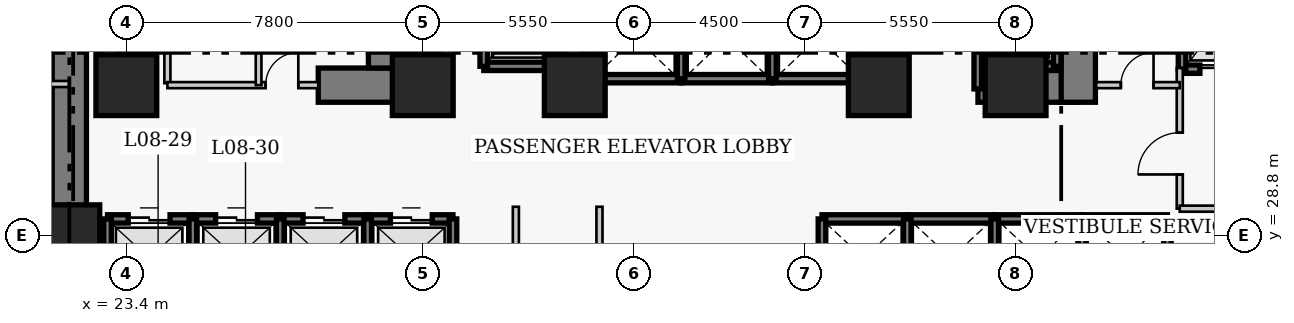
"""IFC4 building model, lengths in metres.
Left out: names, types, materials, properties, quantities, classifications, styles, units other than length and angle.
Written with IfcOpenShell. Run it as: python <this file> out.ifc"""

import sys

from ifc_helpers import new_model, si_unit, direction, frame, frame_2d, origin, origin_2d, place, context, subcontext, project, spatial, rectangle, extrude, element, fill, save


model = new_model("IFC4")
c1 = context("Model", 3, precision=1e-05, world=origin(), true_north=direction((0.0, 1.0)))
c2 = subcontext(c1, "Body", "Model", "MODEL_VIEW")
j1 = project(units=[si_unit("LENGTHUNIT", "METRE"), si_unit("PLANEANGLEUNIT", "RADIAN")], contexts=[c1])
p1 = place(None, origin())
s1 = spatial("IfcSite", under=j1, at=p1, CompositionType="ELEMENT")
p2 = place(p1, origin())
s2 = spatial("IfcBuilding", under=s1, at=p2, CompositionType="ELEMENT")
p3 = place(p2, frame((0.0, 0.0, 37.4)))
s3 = spatial("IfcBuildingStorey", under=s2, at=p3, CompositionType="ELEMENT", Elevation=37.4)
p4 = place(p3, frame((21.9, 27.05, 0.0), z_axis=(0.0, 0.0, 1.0), x_axis=(0.0, 1.0, 0.0)))
e1 = element("IfcWall", 1, at=p4, inside=s3, PredefinedType="SHEAR", context=c2, shape_type="SweptSolid", body=[
    extrude(rectangle(XDim=13.72, YDim=0.9, at=frame_2d((6.86, 0.0))), origin(), (0.0, 0.0, 1.0), 3.8),
])
p5 = place(p3, frame((28.45, 32.75, 0.0), z_axis=(0.0, 0.0, 1.0), x_axis=(1.0, 0.0, 0.0)))
e2 = element("IfcWall", 2, at=p5, inside=s3, PredefinedType="SHEAR", context=c2, shape_type="SweptSolid", body=[
    extrude(rectangle(XDim=2.4, YDim=0.9, at=frame_2d((1.2, 0.0))), origin(), (0.0, 0.0, 1.0), 3.8),
])
p6 = place(p3, frame((45.81, 32.75, 0.0), z_axis=(0.0, 0.0, 1.0), x_axis=(1.0, 0.0, 0.0)))
e3 = element("IfcWall", 3, at=p6, inside=s3, PredefinedType="SHEAR", context=c2, shape_type="SweptSolid", body=[
    extrude(rectangle(XDim=2.64, YDim=0.9, at=frame_2d((1.32, 0.0))), origin(), (0.0, 0.0, 1.0), 3.8),
])
p7 = place(p3, frame((30.22, 33.2, 0.0), z_axis=(0.0, 0.0, 1.0), x_axis=(0.0, 1.0, 0.0)))
e4 = element("IfcWall", 4, at=p7, inside=s3, PredefinedType="SHEAR", context=c2, shape_type="SweptSolid", body=[
    extrude(rectangle(XDim=7.12, YDim=0.9, at=frame_2d((3.56, 0.0))), origin(), (0.0, 0.0, 1.0), 3.8),
])
p8 = place(p3, frame((48.45, 32.3, 0.0), z_axis=(0.0, 0.0, 1.0), x_axis=(0.0, 1.0, 0.0)))
e5 = element("IfcWall", 5, at=p8, inside=s3, PredefinedType="SHEAR", context=c2, shape_type="SweptSolid", body=[
    extrude(rectangle(XDim=8.02, YDim=0.9, at=frame_2d((4.01, 0.0))), origin(), (0.0, 0.0, 1.0), 3.8),
])
p9 = place(p8, frame((5.9, 0.0, 0.0)))
e6 = element("IfcOpeningElement", 6, at=p9, cuts=e5, PredefinedType="OPENING", context=c2, shape_type="SweptSolid", body=[
    extrude(rectangle(XDim=1.1, YDim=2.15, at=frame_2d((0.55, 1.075))), frame((0.0, 0.46, 0.0), z_axis=(0.0, -1.0, 0.0), x_axis=(1.0, 0.0, 0.0)), (0.0, 0.0, 1.0), 0.92),
])
for number, where, z_axis, x_axis in (
    (7, (21.9, 28.8, 0.0), (0.0, 0.0, 1.0), (1.0, 0.0, 0.0)),
    (8, (23.4, 32.75, 0.0), (0.0, 0.0, 1.0), (1.0, 0.0, 0.0)),
    (9, (31.2, 32.75, 0.0), (0.0, 0.0, 1.0), (1.0, 0.0, 0.0)),
    (10, (35.2, 32.75, 0.0), (0.0, 0.0, 1.0), (1.0, 0.0, 0.0)),
    (11, (43.2, 32.75, 0.0), (0.0, 0.0, 1.0), (1.0, 0.0, 0.0)),
    (12, (46.8, 32.75, 0.0), (0.0, 0.0, 1.0), (1.0, 0.0, 0.0)),
):
    element("IfcColumn", number, at=place(p3, frame(where, z_axis=z_axis, x_axis=x_axis)), inside=s3, PredefinedType="COLUMN", context=c2, shape_type="SweptSolid", body=[
        extrude(rectangle(XDim=1.6, YDim=1.6, at=origin_2d()), origin(), (0.0, 0.0, 1.0), 3.8),
    ])
p10 = place(p3, frame((22.905, 29.23, 0.0), z_axis=(0.0, 0.0, 1.0), x_axis=(1.0, 0.0, 0.0)))
e13 = element("IfcWall", 13, at=p10, inside=s3, PredefinedType="SHEAR", context=c2, shape_type="SweptSolid", body=[
    extrude(rectangle(XDim=2.245, YDim=0.22, at=frame_2d((1.123, 0.0))), origin(), (0.0, 0.0, 1.0), 3.8),
])
p11 = place(p10, frame((0.545, 0.0, 0.0)))
e14 = element("IfcOpeningElement", 14, at=p11, cuts=e13, PredefinedType="OPENING", context=c2, shape_type="SweptSolid", body=[
    extrude(rectangle(XDim=1.1, YDim=2.15, at=frame_2d((0.55, 1.075))), frame((0.0, 0.12, 0.0), z_axis=(0.0, -1.0, 0.0), x_axis=(1.0, 0.0, 0.0)), (0.0, 0.0, 1.0), 0.24),
])
p12 = place(p3, frame((22.905, 27.17, 0.0), z_axis=(0.0, 0.0, 1.0), x_axis=(0.0, 1.0, 0.0)))
e15 = element("IfcWall", 15, at=p12, inside=s3, PredefinedType="SHEAR", context=c2, shape_type="SweptSolid", body=[
    extrude(rectangle(XDim=2.06, YDim=0.2, at=frame_2d((1.03, 0.0))), origin(), (0.0, 0.0, 1.0), 3.8),
])
p13 = place(p3, frame((25.15, 29.23, 0.0), z_axis=(0.0, 0.0, 1.0), x_axis=(1.0, 0.0, 0.0)))
e16 = element("IfcWall", 16, at=p13, inside=s3, PredefinedType="SHEAR", context=c2, shape_type="SweptSolid", body=[
    extrude(rectangle(XDim=2.3, YDim=0.22, at=frame_2d((1.15, 0.0))), origin(), (0.0, 0.0, 1.0), 3.8),
])
p14 = place(p13, frame((0.6, 0.0, 0.0)))
e17 = element("IfcOpeningElement", 17, at=p14, cuts=e16, PredefinedType="OPENING", context=c2, shape_type="SweptSolid", body=[
    extrude(rectangle(XDim=1.1, YDim=2.15, at=frame_2d((0.55, 1.075))), frame((0.0, 0.12, 0.0), z_axis=(0.0, -1.0, 0.0), x_axis=(1.0, 0.0, 0.0)), (0.0, 0.0, 1.0), 0.24),
])
p15 = place(p3, frame((25.15, 27.17, 0.0), z_axis=(0.0, 0.0, 1.0), x_axis=(0.0, 1.0, 0.0)))
e18 = element("IfcWall", 18, at=p15, inside=s3, PredefinedType="SHEAR", context=c2, shape_type="SweptSolid", body=[
    extrude(rectangle(XDim=2.06, YDim=0.2, at=frame_2d((1.03, 0.0))), origin(), (0.0, 0.0, 1.0), 3.8),
])
p16 = place(p3, frame((27.45, 29.23, 0.0), z_axis=(0.0, 0.0, 1.0), x_axis=(1.0, 0.0, 0.0)))
e19 = element("IfcWall", 19, at=p16, inside=s3, PredefinedType="SHEAR", context=c2, shape_type="SweptSolid", body=[
    extrude(rectangle(XDim=2.3, YDim=0.22, at=frame_2d((1.15, 0.0))), origin(), (0.0, 0.0, 1.0), 3.8),
])
p17 = place(p16, frame((0.6, 0.0, 0.0)))
e20 = element("IfcOpeningElement", 20, at=p17, cuts=e19, PredefinedType="OPENING", context=c2, shape_type="SweptSolid", body=[
    extrude(rectangle(XDim=1.1, YDim=2.15, at=frame_2d((0.55, 1.075))), frame((0.0, 0.12, 0.0), z_axis=(0.0, -1.0, 0.0), x_axis=(1.0, 0.0, 0.0)), (0.0, 0.0, 1.0), 0.24),
])
p18 = place(p3, frame((27.45, 27.17, 0.0), z_axis=(0.0, 0.0, 1.0), x_axis=(0.0, 1.0, 0.0)))
e21 = element("IfcWall", 21, at=p18, inside=s3, PredefinedType="SHEAR", context=c2, shape_type="SweptSolid", body=[
    extrude(rectangle(XDim=2.06, YDim=0.2, at=frame_2d((1.03, 0.0))), origin(), (0.0, 0.0, 1.0), 3.8),
])
p19 = place(p3, frame((29.75, 29.23, 0.0), z_axis=(0.0, 0.0, 1.0), x_axis=(1.0, 0.0, 0.0)))
e22 = element("IfcWall", 22, at=p19, inside=s3, PredefinedType="SHEAR", context=c2, shape_type="SweptSolid", body=[
    extrude(rectangle(XDim=2.245, YDim=0.22, at=frame_2d((1.123, 0.0))), origin(), (0.0, 0.0, 1.0), 3.8),
])
p20 = place(p19, frame((0.6, 0.0, 0.0)))
e23 = element("IfcOpeningElement", 23, at=p20, cuts=e22, PredefinedType="OPENING", context=c2, shape_type="SweptSolid", body=[
    extrude(rectangle(XDim=1.1, YDim=2.15, at=frame_2d((0.55, 1.075))), frame((0.0, 0.12, 0.0), z_axis=(0.0, -1.0, 0.0), x_axis=(1.0, 0.0, 0.0)), (0.0, 0.0, 1.0), 0.24),
])
for number, where, z_axis, x_axis in (
    (24, (29.75, 27.17, 0.0), (0.0, 0.0, 1.0), (0.0, 1.0, 0.0)),
    (25, (31.995, 27.17, 0.0), (0.0, 0.0, 1.0), (0.0, 1.0, 0.0)),
):
    element("IfcWall", number, at=place(p3, frame(where, z_axis=z_axis, x_axis=x_axis)), inside=s3, PredefinedType="SHEAR", context=c2, shape_type="SweptSolid", body=[
        extrude(rectangle(XDim=2.06, YDim=0.2, at=frame_2d((1.03, 0.0))), origin(), (0.0, 0.0, 1.0), 3.8),
    ])
p21 = place(p3, frame((41.705, 29.23, 0.0), z_axis=(0.0, 0.0, 1.0), x_axis=(1.0, 0.0, 0.0)))
e26 = element("IfcWall", 26, at=p21, inside=s3, PredefinedType="SHEAR", context=c2, shape_type="SweptSolid", body=[
    extrude(rectangle(XDim=2.245, YDim=0.22, at=frame_2d((1.123, 0.0))), origin(), (0.0, 0.0, 1.0), 3.8),
])
p22 = place(p3, frame((41.705, 27.17, 0.0), z_axis=(0.0, 0.0, 1.0), x_axis=(0.0, 1.0, 0.0)))
e27 = element("IfcWall", 27, at=p22, inside=s3, PredefinedType="SHEAR", context=c2, shape_type="SweptSolid", body=[
    extrude(rectangle(XDim=2.06, YDim=0.2, at=frame_2d((1.03, 0.0))), origin(), (0.0, 0.0, 1.0), 3.8),
])
p23 = place(p3, frame((43.95, 29.23, 0.0), z_axis=(0.0, 0.0, 1.0), x_axis=(1.0, 0.0, 0.0)))
e28 = element("IfcWall", 28, at=p23, inside=s3, PredefinedType="SHEAR", context=c2, shape_type="SweptSolid", body=[
    extrude(rectangle(XDim=2.3, YDim=0.22, at=frame_2d((1.15, 0.0))), origin(), (0.0, 0.0, 1.0), 3.8),
])
p24 = place(p3, frame((43.95, 27.17, 0.0), z_axis=(0.0, 0.0, 1.0), x_axis=(0.0, 1.0, 0.0)))
e29 = element("IfcWall", 29, at=p24, inside=s3, PredefinedType="SHEAR", context=c2, shape_type="SweptSolid", body=[
    extrude(rectangle(XDim=2.06, YDim=0.2, at=frame_2d((1.03, 0.0))), origin(), (0.0, 0.0, 1.0), 3.8),
])
p25 = place(p3, frame((46.25, 29.23, 0.0), z_axis=(0.0, 0.0, 1.0), x_axis=(1.0, 0.0, 0.0)))
e30 = element("IfcWall", 30, at=p25, inside=s3, PredefinedType="SHEAR", context=c2, shape_type="SweptSolid", body=[
    extrude(rectangle(XDim=2.3, YDim=0.22, at=frame_2d((1.15, 0.0))), origin(), (0.0, 0.0, 1.0), 3.8),
])
p26 = place(p3, frame((46.25, 27.17, 0.0), z_axis=(0.0, 0.0, 1.0), x_axis=(0.0, 1.0, 0.0)))
e31 = element("IfcWall", 31, at=p26, inside=s3, PredefinedType="SHEAR", context=c2, shape_type="SweptSolid", body=[
    extrude(rectangle(XDim=2.06, YDim=0.2, at=frame_2d((1.03, 0.0))), origin(), (0.0, 0.0, 1.0), 3.8),
])
p27 = place(p3, frame((48.55, 29.23, 0.0), z_axis=(0.0, 0.0, 1.0), x_axis=(1.0, 0.0, 0.0)))
e32 = element("IfcWall", 32, at=p27, inside=s3, PredefinedType="SHEAR", context=c2, shape_type="SweptSolid", body=[
    extrude(rectangle(XDim=2.245, YDim=0.22, at=frame_2d((1.123, 0.0))), origin(), (0.0, 0.0, 1.0), 3.8),
])
for number, where, z_axis, x_axis in (
    (33, (48.55, 27.17, 0.0), (0.0, 0.0, 1.0), (0.0, 1.0, 0.0)),
    (34, (50.795, 27.17, 0.0), (0.0, 0.0, 1.0), (0.0, 1.0, 0.0)),
):
    element("IfcWall", number, at=place(p3, frame(where, z_axis=z_axis, x_axis=x_axis)), inside=s3, PredefinedType="SHEAR", context=c2, shape_type="SweptSolid", body=[
        extrude(rectangle(XDim=2.06, YDim=0.2, at=frame_2d((1.03, 0.0))), origin(), (0.0, 0.0, 1.0), 3.8),
    ])
p28 = place(p3, frame((35.68, 32.92, 0.0), z_axis=(0.0, 0.0, 1.0), x_axis=(1.0, 0.0, 0.0)))
e35 = element("IfcWall", 35, at=p28, inside=s3, PredefinedType="SHEAR", context=c2, shape_type="SweptSolid", body=[
    extrude(rectangle(XDim=2.32, YDim=0.22, at=frame_2d((1.16, 0.0))), origin(), (0.0, 0.0, 1.0), 3.8),
])
p29 = place(p3, frame((35.68, 32.92, 0.0), z_axis=(0.0, 0.0, 1.0), x_axis=(0.0, 1.0, 0.0)))
e36 = element("IfcWall", 36, at=p29, inside=s3, PredefinedType="SHEAR", context=c2, shape_type="SweptSolid", body=[
    extrude(rectangle(XDim=2.16, YDim=0.2, at=frame_2d((1.08, 0.0))), origin(), (0.0, 0.0, 1.0), 3.8),
])
p30 = place(p3, frame((38.0, 32.92, 0.0), z_axis=(0.0, 0.0, 1.0), x_axis=(1.0, 0.0, 0.0)))
e37 = element("IfcWall", 37, at=p30, inside=s3, PredefinedType="SHEAR", context=c2, shape_type="SweptSolid", body=[
    extrude(rectangle(XDim=2.4, YDim=0.22, at=frame_2d((1.2, 0.0))), origin(), (0.0, 0.0, 1.0), 3.8),
])
p31 = place(p3, frame((38.0, 32.92, 0.0), z_axis=(0.0, 0.0, 1.0), x_axis=(0.0, 1.0, 0.0)))
e38 = element("IfcWall", 38, at=p31, inside=s3, PredefinedType="SHEAR", context=c2, shape_type="SweptSolid", body=[
    extrude(rectangle(XDim=2.16, YDim=0.2, at=frame_2d((1.08, 0.0))), origin(), (0.0, 0.0, 1.0), 3.8),
])
p32 = place(p3, frame((40.4, 32.92, 0.0), z_axis=(0.0, 0.0, 1.0), x_axis=(1.0, 0.0, 0.0)))
e39 = element("IfcWall", 39, at=p32, inside=s3, PredefinedType="SHEAR", context=c2, shape_type="SweptSolid", body=[
    extrude(rectangle(XDim=2.32, YDim=0.22, at=frame_2d((1.16, 0.0))), origin(), (0.0, 0.0, 1.0), 3.8),
])
for number, where, z_axis, x_axis in (
    (40, (40.4, 32.92, 0.0), (0.0, 0.0, 1.0), (0.0, 1.0, 0.0)),
    (41, (42.72, 32.92, 0.0), (0.0, 0.0, 1.0), (0.0, 1.0, 0.0)),
):
    element("IfcWall", number, at=place(p3, frame(where, z_axis=z_axis, x_axis=x_axis)), inside=s3, PredefinedType="SHEAR", context=c2, shape_type="SweptSolid", body=[
        extrude(rectangle(XDim=2.16, YDim=0.2, at=frame_2d((1.08, 0.0))), origin(), (0.0, 0.0, 1.0), 3.8),
    ])
p33 = place(p3, frame((51.18, 33.17, 0.0), z_axis=(0.0, 0.0, 1.0), x_axis=(1.0, 0.0, 0.0)))
e42 = element("IfcWall", 42, at=p33, inside=s3, PredefinedType="SHEAR", context=c2, shape_type="SweptSolid", body=[
    extrude(rectangle(XDim=2.42, YDim=0.22, at=frame_2d((1.21, 0.0))), origin(), (0.0, 0.0, 1.0), 3.8),
])
p34 = place(p33, frame((0.47, 0.0, 0.0)))
e43 = element("IfcOpeningElement", 43, at=p34, cuts=e42, PredefinedType="OPENING", context=c2, shape_type="SweptSolid", body=[
    extrude(rectangle(XDim=1.3, YDim=2.15, at=frame_2d((0.65, 1.075))), frame((0.0, 0.12, 0.0), z_axis=(0.0, -1.0, 0.0), x_axis=(1.0, 0.0, 0.0)), (0.0, 0.0, 1.0), 0.24),
])
p35 = place(p3, frame((51.18, 33.17, 0.0), z_axis=(0.0, 0.0, 1.0), x_axis=(0.0, 1.0, 0.0)))
e44 = element("IfcWall", 44, at=p35, inside=s3, PredefinedType="SHEAR", context=c2, shape_type="SweptSolid", body=[
    extrude(rectangle(XDim=2.86, YDim=0.2, at=frame_2d((1.43, 0.0))), origin(), (0.0, 0.0, 1.0), 3.8),
])
p36 = place(p3, frame((32.805, 33.245, 0.0), z_axis=(0.0, 0.0, 1.0), x_axis=(1.0, 0.0, 0.0)))
e45 = element("IfcWall", 45, at=p36, inside=s3, PredefinedType="SHEAR", context=c2, shape_type="SweptSolid", body=[
    extrude(rectangle(XDim=2.09, YDim=0.22, at=frame_2d((1.045, 0.0))), origin(), (0.0, 0.0, 1.0), 3.8),
])
for number, where, z_axis, x_axis in (
    (46, (32.805, 33.245, 0.0), (0.0, 0.0, 1.0), (0.0, 1.0, 0.0)),
    (47, (34.895, 33.245, 0.0), (0.0, 0.0, 1.0), (0.0, 1.0, 0.0)),
):
    element("IfcWall", number, at=place(p3, frame(where, z_axis=z_axis, x_axis=x_axis)), inside=s3, PredefinedType="SHEAR", context=c2, shape_type="SweptSolid", body=[
        extrude(rectangle(XDim=2.91, YDim=0.2, at=frame_2d((1.455, 0.0))), origin(), (0.0, 0.0, 1.0), 3.8),
    ])
p37 = place(p3, frame((45.805, 33.245, 0.0), z_axis=(0.0, 0.0, 1.0), x_axis=(1.0, 0.0, 0.0)))
e48 = element("IfcWall", 48, at=p37, inside=s3, PredefinedType="SHEAR", context=c2, shape_type="SweptSolid", body=[
    extrude(rectangle(XDim=2.09, YDim=0.22, at=frame_2d((1.045, 0.0))), origin(), (0.0, 0.0, 1.0), 3.8),
])
p38 = place(p3, frame((45.805, 32.65, 0.0), z_axis=(0.0, 0.0, 1.0), x_axis=(0.0, 1.0, 0.0)))
e49 = element("IfcWall", 49, at=p38, inside=s3, PredefinedType="SHEAR", context=c2, shape_type="SweptSolid", body=[
    extrude(rectangle(XDim=3.505, YDim=0.2, at=frame_2d((1.752, 0.0))), origin(), (0.0, 0.0, 1.0), 3.8),
])
p39 = place(p3, frame((47.895, 33.245, 0.0), z_axis=(0.0, 0.0, 1.0), x_axis=(0.0, 1.0, 0.0)))
e50 = element("IfcWall", 50, at=p39, inside=s3, PredefinedType="SHEAR", context=c2, shape_type="SweptSolid", body=[
    extrude(rectangle(XDim=2.91, YDim=0.2, at=frame_2d((1.455, 0.0))), origin(), (0.0, 0.0, 1.0), 3.8),
])
p40 = place(p3, frame((24.48, 32.8, 0.0), z_axis=(0.0, 0.0, 1.0), x_axis=(0.0, 1.0, 0.0)))
e51 = element("IfcWall", 51, at=p40, inside=s3, PredefinedType="PARTITIONING", context=c2, shape_type="SweptSolid", body=[
    extrude(rectangle(XDim=3.57, YDim=0.16, at=frame_2d((1.785, 0.0))), origin(), (0.0, 0.0, 1.0), 3.54),
])
p41 = place(p40, frame((1.604, 0.0, 0.0)))
e52 = element("IfcOpeningElement", 52, at=p41, cuts=e51, PredefinedType="OPENING", context=c2, shape_type="SweptSolid", body=[
    extrude(rectangle(XDim=0.9, YDim=2.1, at=frame_2d((0.45, 1.05))), frame((0.0, 0.09, 0.0), z_axis=(0.0, -1.0, 0.0), x_axis=(1.0, 0.0, 0.0)), (0.0, 0.0, 1.0), 0.18),
])
p42 = place(p3, frame((51.12, 29.5, 0.0), z_axis=(0.0, 0.0, 1.0), x_axis=(0.0, 1.0, 0.0)))
e53 = element("IfcWall", 53, at=p42, inside=s3, PredefinedType="PARTITIONING", context=c2, shape_type="SweptSolid", body=[
    extrude(rectangle(XDim=3.7, YDim=0.16, at=frame_2d((1.85, 0.0))), origin(), (0.0, 0.0, 1.0), 3.54),
])
p43 = place(p42, frame((0.9, 0.0, 0.0)))
e54 = element("IfcOpeningElement", 54, at=p43, cuts=e53, PredefinedType="OPENING", context=c2, shape_type="SweptSolid", body=[
    extrude(rectangle(XDim=1.1, YDim=2.15, at=frame_2d((0.55, 1.075))), frame((0.0, 0.09, 0.0), z_axis=(0.0, -1.0, 0.0), x_axis=(1.0, 0.0, 0.0)), (0.0, 0.0, 1.0), 0.18),
])
p44 = place(p3, frame((51.12, 29.5, 0.0), z_axis=(0.0, 0.0, 1.0), x_axis=(1.0, 0.0, 0.0)))
e55 = element("IfcWall", 55, at=p44, inside=s3, PredefinedType="PARTITIONING", context=c2, shape_type="SweptSolid", body=[
    extrude(rectangle(XDim=5.63, YDim=0.16, at=frame_2d((2.815, 0.0))), origin(), (0.0, 0.0, 1.0), 3.54),
])
p45 = place(p3, frame((24.48, 32.75, 0.0), z_axis=(0.0, 0.0, 1.0), x_axis=(1.0, 0.0, 0.0)))
e56 = element("IfcWall", 56, at=p45, inside=s3, PredefinedType="PARTITIONING", context=c2, shape_type="SweptSolid", body=[
    extrude(rectangle(XDim=3.97, YDim=0.16, at=frame_2d((1.985, 0.0))), origin(), (0.0, 0.0, 1.0), 3.54),
])
p46 = place(p45, frame((2.585, 0.0, 0.0)))
e57 = element("IfcOpeningElement", 57, at=p46, cuts=e56, PredefinedType="OPENING", context=c2, shape_type="SweptSolid", body=[
    extrude(rectangle(XDim=0.86, YDim=2.05, at=frame_2d((0.43, 1.025))), frame((0.0, 0.09, 0.0), z_axis=(0.0, -1.0, 0.0), x_axis=(1.0, 0.0, 0.0)), (0.0, 0.0, 1.0), 0.18),
])
p47 = place(p3, frame((48.92, 32.75, 0.0), z_axis=(0.0, 0.0, 1.0), x_axis=(1.0, 0.0, 0.0)))
e58 = element("IfcWall", 58, at=p47, inside=s3, PredefinedType="PARTITIONING", context=c2, shape_type="SweptSolid", body=[
    extrude(rectangle(XDim=2.2, YDim=0.16, at=frame_2d((1.1, 0.0))), origin(), (0.0, 0.0, 1.0), 3.54),
])
p48 = place(p47, frame((0.65, 0.0, 0.0)))
e59 = element("IfcOpeningElement", 59, at=p48, cuts=e58, PredefinedType="OPENING", context=c2, shape_type="SweptSolid", body=[
    extrude(rectangle(XDim=0.86, YDim=2.05, at=frame_2d((0.43, 1.025))), frame((0.0, 0.09, 0.0), z_axis=(0.0, -1.0, 0.0), x_axis=(1.0, 0.0, 0.0)), (0.0, 0.0, 1.0), 0.18),
])
p49 = place(p3, frame((26.88, 32.75, 0.0), z_axis=(0.0, 0.0, 1.0), x_axis=(0.0, 1.0, 0.0)))
e60 = element("IfcWall", 60, at=p49, inside=s3, PredefinedType="PARTITIONING", context=c2, shape_type="SweptSolid", body=[
    extrude(rectangle(XDim=3.62, YDim=0.15, at=frame_2d((1.81, 0.0))), origin(), (0.0, 0.0, 1.0), 3.54),
])
for number, where, z_axis, x_axis in (
    (61, (33.65, 26.41, 0.0), (0.0, 0.0, 1.0), (0.0, 1.0, 0.0)),
    (62, (35.85, 26.41, 0.0), (0.0, 0.0, 1.0), (0.0, 1.0, 0.0)),
):
    element("IfcWall", number, at=place(p3, frame(where, z_axis=z_axis, x_axis=x_axis)), inside=s3, PredefinedType="PARTITIONING", context=c2, shape_type="SweptSolid", body=[
        extrude(rectangle(XDim=3.14, YDim=0.16, at=frame_2d((1.57, 0.0))), origin(), (0.0, 0.0, 1.0), 3.54),
    ])
p50 = place(p3, frame((19.41, 32.78, 0.0), z_axis=(0.0, 0.0, 1.0), x_axis=(1.0, 0.0, 0.0)))
e63 = element("IfcWall", 63, at=p50, inside=s3, PredefinedType="PARTITIONING", context=c2, shape_type="SweptSolid", body=[
    extrude(rectangle(XDim=2.49, YDim=0.16, at=frame_2d((1.245, 0.0))), origin(), (0.0, 0.0, 1.0), 3.54),
])
p51 = place(p11, origin())
e64 = element("IfcDoor", 64, at=p51, inside=s3, OperationType="DOUBLE_DOOR_SLIDING", PredefinedType="DOOR", context=c2, shape_type="SweptSolid", body=[
    extrude(rectangle(XDim=1.1, YDim=2.15, at=frame_2d((0.55, 1.075))), frame((0.0, 0.025, 0.0), z_axis=(0.0, -1.0, 0.0), x_axis=(1.0, 0.0, 0.0)), (0.0, 0.0, 1.0), 0.05),
])
fill(e14, e64)
p52 = place(p14, origin())
e65 = element("IfcDoor", 65, at=p52, inside=s3, OperationType="DOUBLE_DOOR_SLIDING", PredefinedType="DOOR", context=c2, shape_type="SweptSolid", body=[
    extrude(rectangle(XDim=1.1, YDim=2.15, at=frame_2d((0.55, 1.075))), frame((0.0, 0.025, 0.0), z_axis=(0.0, -1.0, 0.0), x_axis=(1.0, 0.0, 0.0)), (0.0, 0.0, 1.0), 0.05),
])
fill(e17, e65)
p53 = place(p17, origin())
e66 = element("IfcDoor", 66, at=p53, inside=s3, OperationType="DOUBLE_DOOR_SLIDING", PredefinedType="DOOR", context=c2, shape_type="SweptSolid", body=[
    extrude(rectangle(XDim=1.1, YDim=2.15, at=frame_2d((0.55, 1.075))), frame((0.0, 0.025, 0.0), z_axis=(0.0, -1.0, 0.0), x_axis=(1.0, 0.0, 0.0)), (0.0, 0.0, 1.0), 0.05),
])
fill(e20, e66)
p54 = place(p20, origin())
e67 = element("IfcDoor", 67, at=p54, inside=s3, OperationType="DOUBLE_DOOR_SLIDING", PredefinedType="DOOR", context=c2, shape_type="SweptSolid", body=[
    extrude(rectangle(XDim=1.1, YDim=2.15, at=frame_2d((0.55, 1.075))), frame((0.0, 0.025, 0.0), z_axis=(0.0, -1.0, 0.0), x_axis=(1.0, 0.0, 0.0)), (0.0, 0.0, 1.0), 0.05),
])
fill(e23, e67)
p55 = place(p34, origin())
e68 = element("IfcDoor", 68, at=p55, inside=s3, OperationType="DOUBLE_DOOR_SLIDING", PredefinedType="DOOR", context=c2, shape_type="SweptSolid", body=[
    extrude(rectangle(XDim=1.3, YDim=2.15, at=frame_2d((0.65, 1.075))), frame((0.0, 0.025, 0.0), z_axis=(0.0, -1.0, 0.0), x_axis=(1.0, 0.0, 0.0)), (0.0, 0.0, 1.0), 0.05),
])
fill(e43, e68)
p56 = place(p43, origin())
e69 = element("IfcDoor", 69, at=p56, inside=s3, OperationType="SINGLE_SWING_LEFT", PredefinedType="DOOR", context=c2, shape_type="SweptSolid", body=[
    extrude(rectangle(XDim=1.1, YDim=2.15, at=frame_2d((0.55, 1.075))), frame((0.0, 0.025, 0.0), z_axis=(0.0, -1.0, 0.0), x_axis=(1.0, 0.0, 0.0)), (0.0, 0.0, 1.0), 0.05),
])
fill(e54, e69)
p57 = place(p46, origin())
e70 = element("IfcDoor", 70, at=p57, inside=s3, OperationType="SINGLE_SWING_RIGHT", PredefinedType="DOOR", context=c2, shape_type="SweptSolid", body=[
    extrude(rectangle(XDim=0.86, YDim=2.05, at=frame_2d((0.43, 1.025))), frame((0.0, 0.025, 0.0), z_axis=(0.0, -1.0, 0.0), x_axis=(1.0, 0.0, 0.0)), (0.0, 0.0, 1.0), 0.05),
])
fill(e57, e70)
p58 = place(p48, origin())
e71 = element("IfcDoor", 71, at=p58, inside=s3, OperationType="SINGLE_SWING_RIGHT", PredefinedType="DOOR", context=c2, shape_type="SweptSolid", body=[
    extrude(rectangle(XDim=0.86, YDim=2.05, at=frame_2d((0.43, 1.025))), frame((0.0, 0.025, 0.0), z_axis=(0.0, -1.0, 0.0), x_axis=(1.0, 0.0, 0.0)), (0.0, 0.0, 1.0), 0.05),
])
fill(e59, e71)
save(model, sys.argv[1])
